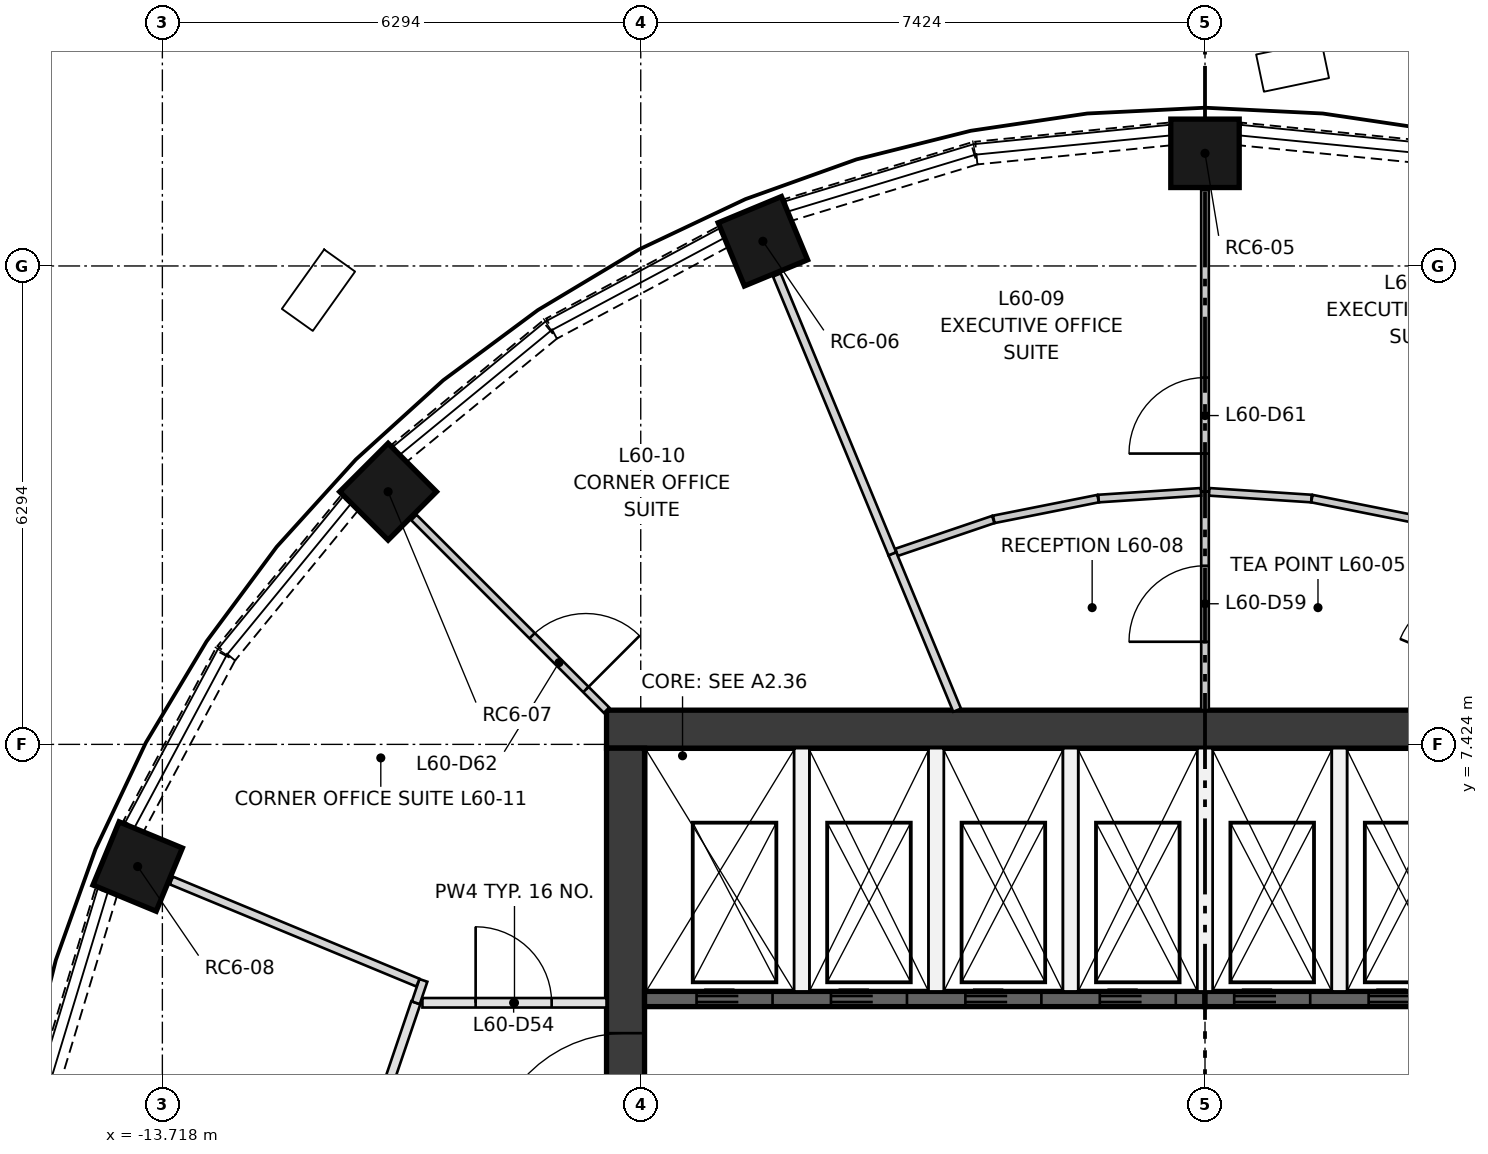
"""IFC4 building model, lengths in metres.
Left out: names, types, materials, properties, quantities, classifications, styles, units other than length and angle.
Written with IfcOpenShell. Run it as: python <this file> out.ifc"""

import sys

from ifc_helpers import new_model, si_unit, direction, frame, frame_2d, origin, origin_2d, place, context, subcontext, project, spatial, rectangle, extrude, element, fill, save


model = new_model("IFC4")
c1 = context("Model", 3, precision=1e-05, world=origin(), true_north=direction((0.0, 1.0)))
c2 = subcontext(c1, "Body", "Model", "MODEL_VIEW")
j1 = project(units=[si_unit("LENGTHUNIT", "METRE"), si_unit("PLANEANGLEUNIT", "RADIAN")], contexts=[c1])
p1 = place(None, origin())
s1 = spatial("IfcSite", under=j1, at=p1, CompositionType="ELEMENT")
p2 = place(p1, origin())
s2 = spatial("IfcBuilding", under=s1, at=p2, CompositionType="ELEMENT")
p3 = place(p2, frame((0.0, 0.0, 221.15)))
s3 = spatial("IfcBuildingStorey", under=s2, at=p3, CompositionType="ELEMENT", Elevation=221.15)
for number, where, z_axis, x_axis in (
    (1, (0.0, 15.2, 0.0), (0.0, 0.0, 1.0), (0.0, 1.0, 0.0)),
    (2, (-5.817, 14.043, 0.0), (0.0, 0.0, 1.0), (-0.383, 0.924, 0.0)),
    (3, (-10.748, 10.748, 0.0), (0.0, 0.0, 1.0), (-0.707, 0.707, 0.0)),
    (4, (-14.043, 5.817, 0.0), (0.0, 0.0, 1.0), (-0.924, 0.383, 0.0)),
):
    element("IfcColumn", number, at=place(p3, frame(where, z_axis=z_axis, x_axis=x_axis)), inside=s3, PredefinedType="COLUMN", context=c2, shape_type="SweptSolid", body=[
        extrude(rectangle(XDim=0.9, YDim=0.9, at=origin_2d()), origin(), (0.0, 0.0, 1.0), 2.85),
    ])
p4 = place(p3, frame((-7.874, 7.624, 0.0), z_axis=(0.0, 0.0, 1.0), x_axis=(1.0, 0.0, 0.0)))
e5 = element("IfcWall", 5, at=p4, inside=s3, PredefinedType="SHEAR", context=c2, shape_type="SweptSolid", body=[
    extrude(rectangle(XDim=15.748, YDim=0.5, at=frame_2d((7.874, 0.0))), origin(), (0.0, 0.0, 1.0), 3.35),
])
p5 = place(p3, frame((-7.624, -7.374, 0.0), z_axis=(0.0, 0.0, 1.0), x_axis=(0.0, 1.0, 0.0)))
e6 = element("IfcWall", 6, at=p5, inside=s3, PredefinedType="SHEAR", context=c2, shape_type="SweptSolid", body=[
    extrude(rectangle(XDim=14.748, YDim=0.5, at=frame_2d((7.374, 0.0))), origin(), (0.0, 0.0, 1.0), 3.35),
])
p6 = place(p5, frame((6.874, 0.0, 0.0)))
e7 = element("IfcOpeningElement", 7, at=p6, cuts=e6, PredefinedType="OPENING", context=c2, shape_type="SweptSolid", body=[
    extrude(rectangle(XDim=1.0, YDim=2.1, at=frame_2d((0.5, 1.05))), frame((0.0, 0.26, 0.0), z_axis=(0.0, -1.0, 0.0), x_axis=(1.0, 0.0, 0.0)), (0.0, 0.0, 1.0), 0.52),
])
p7 = place(p5, frame((3.75, 0.0, 0.0)))
e8 = element("IfcOpeningElement", 8, at=p7, cuts=e6, PredefinedType="OPENING", context=c2, shape_type="SweptSolid", body=[
    extrude(rectangle(XDim=1.8, YDim=2.1, at=frame_2d((0.9, 1.05))), frame((0.0, 0.26, 0.0), z_axis=(0.0, -1.0, 0.0), x_axis=(1.0, 0.0, 0.0)), (0.0, 0.0, 1.0), 0.52),
])
p8 = place(p5, frame((9.198, 0.0, 0.0)))
e9 = element("IfcOpeningElement", 9, at=p8, cuts=e6, PredefinedType="OPENING", context=c2, shape_type="SweptSolid", body=[
    extrude(rectangle(XDim=1.8, YDim=2.1, at=frame_2d((0.9, 1.05))), frame((0.0, 0.26, 0.0), z_axis=(0.0, -1.0, 0.0), x_axis=(1.0, 0.0, 0.0)), (0.0, 0.0, 1.0), 0.52),
])
p9 = place(p3, frame((-7.374, 4.074, 0.0), z_axis=(0.0, 0.0, 1.0), x_axis=(1.0, 0.0, 0.0)))
e10 = element("IfcWall", 10, at=p9, inside=s3, PredefinedType="SHEAR", context=c2, shape_type="SweptSolid", body=[
    extrude(rectangle(XDim=7.374, YDim=0.2, at=frame_2d((3.687, 0.0))), origin(), (0.0, 0.0, 1.0), 3.0),
])
p10 = place(p9, frame((0.684, 0.0, 0.0)))
e11 = element("IfcOpeningElement", 11, at=p10, cuts=e10, PredefinedType="OPENING", context=c2, shape_type="SweptSolid", body=[
    extrude(rectangle(XDim=1.0, YDim=2.1, at=frame_2d((0.5, 1.05))), frame((0.0, 0.11, 0.0), z_axis=(0.0, -1.0, 0.0), x_axis=(1.0, 0.0, 0.0)), (0.0, 0.0, 1.0), 0.22),
])
p11 = place(p9, frame((2.453, 0.0, 0.0)))
e12 = element("IfcOpeningElement", 12, at=p11, cuts=e10, PredefinedType="OPENING", context=c2, shape_type="SweptSolid", body=[
    extrude(rectangle(XDim=1.0, YDim=2.1, at=frame_2d((0.5, 1.05))), frame((0.0, 0.11, 0.0), z_axis=(0.0, -1.0, 0.0), x_axis=(1.0, 0.0, 0.0)), (0.0, 0.0, 1.0), 0.22),
])
p12 = place(p9, frame((4.221, 0.0, 0.0)))
e13 = element("IfcOpeningElement", 13, at=p12, cuts=e10, PredefinedType="OPENING", context=c2, shape_type="SweptSolid", body=[
    extrude(rectangle(XDim=1.0, YDim=2.1, at=frame_2d((0.5, 1.05))), frame((0.0, 0.11, 0.0), z_axis=(0.0, -1.0, 0.0), x_axis=(1.0, 0.0, 0.0)), (0.0, 0.0, 1.0), 0.22),
])
p13 = place(p9, frame((5.99, 0.0, 0.0)))
e14 = element("IfcOpeningElement", 14, at=p13, cuts=e10, PredefinedType="OPENING", context=c2, shape_type="SweptSolid", body=[
    extrude(rectangle(XDim=1.0, YDim=2.1, at=frame_2d((0.5, 1.05))), frame((0.0, 0.11, 0.0), z_axis=(0.0, -1.0, 0.0), x_axis=(1.0, 0.0, 0.0)), (0.0, 0.0, 1.0), 0.22),
])
p14 = place(p3, frame((0.0, 4.074, 0.0), z_axis=(0.0, 0.0, 1.0), x_axis=(1.0, 0.0, 0.0)))
e15 = element("IfcWall", 15, at=p14, inside=s3, PredefinedType="SHEAR", context=c2, shape_type="SweptSolid", body=[
    extrude(rectangle(XDim=7.374, YDim=0.2, at=frame_2d((3.687, 0.0))), origin(), (0.0, 0.0, 1.0), 3.0),
])
p15 = place(p14, frame((0.384, 0.0, 0.0)))
e16 = element("IfcOpeningElement", 16, at=p15, cuts=e15, PredefinedType="OPENING", context=c2, shape_type="SweptSolid", body=[
    extrude(rectangle(XDim=1.0, YDim=2.1, at=frame_2d((0.5, 1.05))), frame((0.0, 0.11, 0.0), z_axis=(0.0, -1.0, 0.0), x_axis=(1.0, 0.0, 0.0)), (0.0, 0.0, 1.0), 0.22),
])
p16 = place(p14, frame((2.153, 0.0, 0.0)))
e17 = element("IfcOpeningElement", 17, at=p16, cuts=e15, PredefinedType="OPENING", context=c2, shape_type="SweptSolid", body=[
    extrude(rectangle(XDim=1.0, YDim=2.1, at=frame_2d((0.5, 1.05))), frame((0.0, 0.11, 0.0), z_axis=(0.0, -1.0, 0.0), x_axis=(1.0, 0.0, 0.0)), (0.0, 0.0, 1.0), 0.22),
])
p17 = place(p14, frame((3.921, 0.0, 0.0)))
e18 = element("IfcOpeningElement", 18, at=p17, cuts=e15, PredefinedType="OPENING", context=c2, shape_type="SweptSolid", body=[
    extrude(rectangle(XDim=1.0, YDim=2.1, at=frame_2d((0.5, 1.05))), frame((0.0, 0.11, 0.0), z_axis=(0.0, -1.0, 0.0), x_axis=(1.0, 0.0, 0.0)), (0.0, 0.0, 1.0), 0.22),
])
p18 = place(p14, frame((5.79, 0.0, 0.0)))
e19 = element("IfcOpeningElement", 19, at=p18, cuts=e15, PredefinedType="OPENING", context=c2, shape_type="SweptSolid", body=[
    extrude(rectangle(XDim=0.8, YDim=2.1, at=frame_2d((0.4, 1.05))), frame((0.0, 0.11, 0.0), z_axis=(0.0, -1.0, 0.0), x_axis=(1.0, 0.0, 0.0)), (0.0, 0.0, 1.0), 0.22),
])
for number, where, z_axis, x_axis in (
    (20, (-5.305, 4.174, 0.0), (0.0, 0.0, 1.0), (0.0, 1.0, 0.0)),
    (21, (-3.537, 4.174, 0.0), (0.0, 0.0, 1.0), (0.0, 1.0, 0.0)),
    (22, (-1.769, 4.174, 0.0), (0.0, 0.0, 1.0), (0.0, 1.0, 0.0)),
    (23, (0.0, 4.174, 0.0), (0.0, 0.0, 1.0), (0.0, 1.0, 0.0)),
    (24, (1.769, 4.174, 0.0), (0.0, 0.0, 1.0), (0.0, 1.0, 0.0)),
):
    element("IfcWall", number, at=place(p3, frame(where, z_axis=z_axis, x_axis=x_axis)), inside=s3, PredefinedType="PARTITIONING", context=c2, shape_type="SweptSolid", body=[
        extrude(rectangle(XDim=3.2, YDim=0.2, at=frame_2d((1.6, 0.0))), origin(), (0.0, 0.0, 1.0), 3.0),
    ])
for number, where, z_axis, x_axis in (
    (25, (3.009, 15.204, 0.0), (0.0, 0.0, 1.0), (-0.995, 0.098, 0.0)),
    (26, (-0.464, 15.455, 0.0), (0.0, 0.0, 1.0), (-0.995, -0.098, 0.0)),
):
    element("IfcWall", number, at=place(p3, frame(where, z_axis=z_axis, x_axis=x_axis)), inside=s3, PredefinedType="SOLIDWALL", context=c2, shape_type="SweptSolid", body=[
        extrude(rectangle(XDim=2.558, YDim=0.3, at=frame_2d((1.279, 0.0))), origin(), (0.0, 0.0, 1.0), 0.9),
    ])
p19 = place(p3, frame((-3.038, 15.198, 0.0), z_axis=(0.0, 0.0, 1.0), x_axis=(-0.956960147557, -0.290219358397, 0.0)))
e27 = element("IfcWall", 27, at=p19, inside=s3, PredefinedType="SOLIDWALL", context=c2, shape_type="SweptSolid", body=[
    extrude(rectangle(XDim=2.557, YDim=0.3, at=frame_2d((1.279, 0.0))), origin(), (0.0, 0.0, 1.0), 0.9),
])
p20 = place(p3, frame((-6.343, 14.1, 0.0), z_axis=(0.0, 0.0, 1.0), x_axis=(-0.881810499649, -0.471603904468, 0.0)))
e28 = element("IfcWall", 28, at=p20, inside=s3, PredefinedType="SOLIDWALL", context=c2, shape_type="SweptSolid", body=[
    extrude(rectangle(XDim=2.557, YDim=0.3, at=frame_2d((1.278, 0.0))), origin(), (0.0, 0.0, 1.0), 0.9),
])
for number, where, z_axis, x_axis in (
    (29, (-8.623, 12.877, 0.0), (0.0, 0.0, 1.0), (-0.773, -0.634, 0.0)),
    (30, (-11.256, 10.6, 0.0), (0.0, 0.0, 1.0), (-0.634, -0.773, 0.0)),
):
    element("IfcWall", number, at=place(p3, frame(where, z_axis=z_axis, x_axis=x_axis)), inside=s3, PredefinedType="SOLIDWALL", context=c2, shape_type="SweptSolid", body=[
        extrude(rectangle(XDim=2.558, YDim=0.3, at=frame_2d((1.279, 0.0))), origin(), (0.0, 0.0, 1.0), 0.9),
    ])
p21 = place(p3, frame((-12.894, 8.598, 0.0), z_axis=(0.0, 0.0, 1.0), x_axis=(-0.471603904468, -0.881810499649, 0.0)))
e31 = element("IfcWall", 31, at=p21, inside=s3, PredefinedType="SOLIDWALL", context=c2, shape_type="SweptSolid", body=[
    extrude(rectangle(XDim=2.557, YDim=0.3, at=frame_2d((1.278, 0.0))), origin(), (0.0, 0.0, 1.0), 0.9),
])
p22 = place(p3, frame((-14.455, 5.486, 0.0), z_axis=(0.0, 0.0, 1.0), x_axis=(-0.290219358397, -0.956960147557, 0.0)))
e32 = element("IfcWall", 32, at=p22, inside=s3, PredefinedType="SOLIDWALL", context=c2, shape_type="SweptSolid", body=[
    extrude(rectangle(XDim=2.557, YDim=0.3, at=frame_2d((1.279, 0.0))), origin(), (0.0, 0.0, 1.0), 0.9),
])
p23 = place(p3, frame((-10.296, 4.024, 0.0), z_axis=(0.0, 0.0, 1.0), x_axis=(1.0, 0.0, 0.0)))
e33 = element("IfcWall", 33, at=p23, inside=s3, PredefinedType="PARTITIONING", context=c2, shape_type="SweptSolid", body=[
    extrude(rectangle(XDim=2.422, YDim=0.125, at=frame_2d((1.211, 0.0))), origin(), (0.0, 0.0, 1.0), 3.0),
])
p24 = place(p23, frame((0.7, 0.0, 0.0)))
e34 = element("IfcOpeningElement", 34, at=p24, cuts=e33, PredefinedType="OPENING", context=c2, shape_type="SweptSolid", body=[
    extrude(rectangle(XDim=1.0, YDim=2.1, at=frame_2d((0.5, 1.05))), frame((0.0, 0.073, 0.0), z_axis=(0.0, -1.0, 0.0), x_axis=(1.0, 0.0, 0.0)), (0.0, 0.0, 1.0), 0.145),
])
p25 = place(p3, frame((-10.769, 2.89, 0.0), z_axis=(0.0, 0.0, 1.0), x_axis=(0.321479033524, 0.946916696972, 0.0)))
e35 = element("IfcWall", 35, at=p25, inside=s3, PredefinedType="PARTITIONING", context=c2, shape_type="SweptSolid", body=[
    extrude(rectangle(XDim=1.198, YDim=0.125, at=frame_2d((0.599, 0.0))), origin(), (0.0, 0.0, 1.0), 3.0),
])
p26 = place(p3, frame((0.053, 10.747, 0.0), z_axis=(0.0, 0.0, 1.0), x_axis=(0.99785346224, -0.06548639473, 0.0)))
e36 = element("IfcWall", 36, at=p26, inside=s3, PredefinedType="PARTITIONING", context=c2, shape_type="SweptSolid", body=[
    extrude(rectangle(XDim=1.35, YDim=0.1, at=frame_2d((0.675, 0.0))), origin(), (0.0, 0.0, 1.0), 3.0),
])
p27 = place(p3, frame((1.406, 10.657, 0.0), z_axis=(0.0, 0.0, 1.0), x_axis=(0.980761417594, -0.19521025014, 0.0)))
e37 = element("IfcWall", 37, at=p27, inside=s3, PredefinedType="PARTITIONING", context=c2, shape_type="SweptSolid", body=[
    extrude(rectangle(XDim=1.399, YDim=0.1, at=frame_2d((0.7, 0.0))), origin(), (0.0, 0.0, 1.0), 3.0),
])
p28 = place(p3, frame((0.0, 7.874, 0.0), z_axis=(0.0, 0.0, 1.0), x_axis=(0.0, 1.0, 0.0)))
e38 = element("IfcWall", 38, at=p28, inside=s3, PredefinedType="PARTITIONING", context=c2, shape_type="SweptSolid", body=[
    extrude(rectangle(XDim=2.876, YDim=0.1, at=frame_2d((1.438, 0.0))), origin(), (0.0, 0.0, 1.0), 3.0),
])
p29 = place(p28, frame((0.9, 0.0, 0.0)))
e39 = element("IfcOpeningElement", 39, at=p29, cuts=e38, PredefinedType="OPENING", context=c2, shape_type="SweptSolid", body=[
    extrude(rectangle(XDim=1.0, YDim=2.1, at=frame_2d((0.5, 1.05))), frame((0.0, 0.06, 0.0), z_axis=(0.0, -1.0, 0.0), x_axis=(1.0, 0.0, 0.0)), (0.0, 0.0, 1.0), 0.12),
])
p30 = place(p3, frame((0.0, 10.75, 0.0), z_axis=(0.0, 0.0, 1.0), x_axis=(0.0, 1.0, 0.0)))
e40 = element("IfcWall", 40, at=p30, inside=s3, PredefinedType="PARTITIONING", context=c2, shape_type="SweptSolid", body=[
    extrude(rectangle(XDim=3.97, YDim=0.1, at=frame_2d((1.985, 0.0))), origin(), (0.0, 0.0, 1.0), 3.0),
])
p31 = place(p30, frame((0.5, 0.0, 0.0)))
e41 = element("IfcOpeningElement", 41, at=p31, cuts=e40, PredefinedType="OPENING", context=c2, shape_type="SweptSolid", body=[
    extrude(rectangle(XDim=1.0, YDim=2.1, at=frame_2d((0.5, 1.05))), frame((0.0, 0.06, 0.0), z_axis=(0.0, -1.0, 0.0), x_axis=(1.0, 0.0, 0.0)), (0.0, 0.0, 1.0), 0.12),
])
p32 = place(p3, frame((-4.059, 9.95, 0.0), z_axis=(0.0, 0.0, 1.0), x_axis=(0.946944164887, 0.321398115407, 0.0)))
e42 = element("IfcWall", 42, at=p32, inside=s3, PredefinedType="PARTITIONING", context=c2, shape_type="SweptSolid", body=[
    extrude(rectangle(XDim=1.344, YDim=0.1, at=frame_2d((0.672, 0.0))), origin(), (0.0, 0.0, 1.0), 3.0),
])
p33 = place(p3, frame((-2.779, 10.384, 0.0), z_axis=(0.0, 0.0, 1.0), x_axis=(0.980761417594, 0.19521025014, 0.0)))
e43 = element("IfcWall", 43, at=p33, inside=s3, PredefinedType="PARTITIONING", context=c2, shape_type="SweptSolid", body=[
    extrude(rectangle(XDim=1.399, YDim=0.1, at=frame_2d((0.7, 0.0))), origin(), (0.0, 0.0, 1.0), 3.0),
])
p34 = place(p3, frame((-1.4, 10.658, 0.0), z_axis=(0.0, 0.0, 1.0), x_axis=(0.99785346224, 0.06548639473, 0.0)))
e44 = element("IfcWall", 44, at=p34, inside=s3, PredefinedType="PARTITIONING", context=c2, shape_type="SweptSolid", body=[
    extrude(rectangle(XDim=1.35, YDim=0.1, at=frame_2d((0.675, 0.0))), origin(), (0.0, 0.0, 1.0), 3.0),
])
p35 = place(p3, frame((-3.261, 7.874, 0.0), z_axis=(0.0, 0.0, 1.0), x_axis=(-0.382684189911, 0.923879218725, 0.0)))
e45 = element("IfcWall", 45, at=p35, inside=s3, PredefinedType="PARTITIONING", context=c2, shape_type="SweptSolid", body=[
    extrude(rectangle(XDim=2.227, YDim=0.11, at=frame_2d((1.114, 0.0))), origin(), (0.0, 0.0, 1.0), 3.0),
])
p36 = place(p3, frame((-4.114, 9.932, 0.0), z_axis=(0.0, 0.0, 1.0), x_axis=(-0.382675844596, 0.923882675432, 0.0)))
e46 = element("IfcWall", 46, at=p36, inside=s3, PredefinedType="PARTITIONING", context=c2, shape_type="SweptSolid", body=[
    extrude(rectangle(XDim=3.97, YDim=0.11, at=frame_2d((1.985, 0.0))), origin(), (0.0, 0.0, 1.0), 3.0),
])
p37 = place(p3, frame((-10.409, 10.409, 0.0), z_axis=(0.0, 0.0, 1.0), x_axis=(0.707106781187, -0.707106781187, 0.0)))
e47 = element("IfcWall", 47, at=p37, inside=s3, PredefinedType="PARTITIONING", context=c2, shape_type="SweptSolid", body=[
    extrude(rectangle(XDim=3.584, YDim=0.1, at=frame_2d((1.792, 0.0))), origin(), (0.0, 0.0, 1.0), 3.0),
])
p38 = place(p37, frame((2.2, 0.0, 0.0)))
e48 = element("IfcOpeningElement", 48, at=p38, cuts=e47, PredefinedType="OPENING", context=c2, shape_type="SweptSolid", body=[
    extrude(rectangle(XDim=1.0, YDim=2.1, at=frame_2d((0.5, 1.05))), frame((0.0, 0.06, 0.0), z_axis=(0.0, -1.0, 0.0), x_axis=(1.0, 0.0, 0.0)), (0.0, 0.0, 1.0), 0.12),
])
p39 = place(p3, frame((-10.384, 4.024, 0.0), z_axis=(0.0, 0.0, 1.0), x_axis=(0.320931919594, 0.947102266382, 0.0)))
e49 = element("IfcWall", 49, at=p39, inside=s3, PredefinedType="PARTITIONING", context=c2, shape_type="SweptSolid", body=[
    extrude(rectangle(XDim=0.311, YDim=0.11, at=frame_2d((0.156, 0.0))), origin(), (0.0, 0.0, 1.0), 3.0),
])
p40 = place(p3, frame((-10.356, 4.289, 0.0), z_axis=(0.0, 0.0, 1.0), x_axis=(-0.923871065891, 0.382703871955, 0.0)))
e50 = element("IfcWall", 50, at=p40, inside=s3, PredefinedType="PARTITIONING", context=c2, shape_type="SweptSolid", body=[
    extrude(rectangle(XDim=3.511, YDim=0.11, at=frame_2d((1.756, 0.0))), origin(), (0.0, 0.0, 1.0), 3.0),
])
p41 = place(p10, frame((1.0, 0.0, 0.0), z_axis=(0.0, 0.0, 1.0), x_axis=(-1.0, 0.0, 0.0)))
e51 = element("IfcDoor", 51, at=p41, inside=s3, OperationType="DOUBLE_DOOR_SLIDING", PredefinedType="DOOR", context=c2, shape_type="SweptSolid", body=[
    extrude(rectangle(XDim=1.0, YDim=2.1, at=frame_2d((0.5, 1.05))), frame((0.0, 0.025, 0.0), z_axis=(0.0, -1.0, 0.0), x_axis=(1.0, 0.0, 0.0)), (0.0, 0.0, 1.0), 0.05),
])
fill(e11, e51)
p42 = place(p11, frame((1.0, 0.0, 0.0), z_axis=(0.0, 0.0, 1.0), x_axis=(-1.0, 0.0, 0.0)))
e52 = element("IfcDoor", 52, at=p42, inside=s3, OperationType="DOUBLE_DOOR_SLIDING", PredefinedType="DOOR", context=c2, shape_type="SweptSolid", body=[
    extrude(rectangle(XDim=1.0, YDim=2.1, at=frame_2d((0.5, 1.05))), frame((0.0, 0.025, 0.0), z_axis=(0.0, -1.0, 0.0), x_axis=(1.0, 0.0, 0.0)), (0.0, 0.0, 1.0), 0.05),
])
fill(e12, e52)
p43 = place(p12, frame((1.0, 0.0, 0.0), z_axis=(0.0, 0.0, 1.0), x_axis=(-1.0, 0.0, 0.0)))
e53 = element("IfcDoor", 53, at=p43, inside=s3, OperationType="DOUBLE_DOOR_SLIDING", PredefinedType="DOOR", context=c2, shape_type="SweptSolid", body=[
    extrude(rectangle(XDim=1.0, YDim=2.1, at=frame_2d((0.5, 1.05))), frame((0.0, 0.025, 0.0), z_axis=(0.0, -1.0, 0.0), x_axis=(1.0, 0.0, 0.0)), (0.0, 0.0, 1.0), 0.05),
])
fill(e13, e53)
p44 = place(p13, frame((1.0, 0.0, 0.0), z_axis=(0.0, 0.0, 1.0), x_axis=(-1.0, 0.0, 0.0)))
e54 = element("IfcDoor", 54, at=p44, inside=s3, OperationType="DOUBLE_DOOR_SLIDING", PredefinedType="DOOR", context=c2, shape_type="SweptSolid", body=[
    extrude(rectangle(XDim=1.0, YDim=2.1, at=frame_2d((0.5, 1.05))), frame((0.0, 0.025, 0.0), z_axis=(0.0, -1.0, 0.0), x_axis=(1.0, 0.0, 0.0)), (0.0, 0.0, 1.0), 0.05),
])
fill(e14, e54)
p45 = place(p15, frame((1.0, 0.0, 0.0), z_axis=(0.0, 0.0, 1.0), x_axis=(-1.0, 0.0, 0.0)))
e55 = element("IfcDoor", 55, at=p45, inside=s3, OperationType="DOUBLE_DOOR_SLIDING", PredefinedType="DOOR", context=c2, shape_type="SweptSolid", body=[
    extrude(rectangle(XDim=1.0, YDim=2.1, at=frame_2d((0.5, 1.05))), frame((0.0, 0.025, 0.0), z_axis=(0.0, -1.0, 0.0), x_axis=(1.0, 0.0, 0.0)), (0.0, 0.0, 1.0), 0.05),
])
fill(e16, e55)
p46 = place(p16, frame((1.0, 0.0, 0.0), z_axis=(0.0, 0.0, 1.0), x_axis=(-1.0, 0.0, 0.0)))
e56 = element("IfcDoor", 56, at=p46, inside=s3, OperationType="DOUBLE_DOOR_SLIDING", PredefinedType="DOOR", context=c2, shape_type="SweptSolid", body=[
    extrude(rectangle(XDim=1.0, YDim=2.1, at=frame_2d((0.5, 1.05))), frame((0.0, 0.025, 0.0), z_axis=(0.0, -1.0, 0.0), x_axis=(1.0, 0.0, 0.0)), (0.0, 0.0, 1.0), 0.05),
])
fill(e17, e56)
p47 = place(p8, origin())
e57 = element("IfcDoor", 57, at=p47, inside=s3, OperationType="DOUBLE_DOOR_SINGLE_SWING", PredefinedType="DOOR", context=c2, shape_type="SweptSolid", body=[
    extrude(rectangle(XDim=1.8, YDim=2.1, at=frame_2d((0.9, 1.05))), frame((0.0, 0.025, 0.0), z_axis=(0.0, -1.0, 0.0), x_axis=(1.0, 0.0, 0.0)), (0.0, 0.0, 1.0), 0.05),
])
fill(e9, e57)
p48 = place(p24, origin())
e58 = element("IfcDoor", 58, at=p48, inside=s3, OperationType="SINGLE_SWING_LEFT", PredefinedType="DOOR", context=c2, shape_type="SweptSolid", body=[
    extrude(rectangle(XDim=1.0, YDim=2.1, at=frame_2d((0.5, 1.05))), frame((0.0, 0.025, 0.0), z_axis=(0.0, -1.0, 0.0), x_axis=(1.0, 0.0, 0.0)), (0.0, 0.0, 1.0), 0.05),
])
fill(e34, e58)
p49 = place(p29, origin())
e59 = element("IfcDoor", 59, at=p49, inside=s3, OperationType="SINGLE_SWING_LEFT", PredefinedType="DOOR", context=c2, shape_type="SweptSolid", body=[
    extrude(rectangle(XDim=1.0, YDim=2.1, at=frame_2d((0.5, 1.05))), frame((0.0, 0.025, 0.0), z_axis=(0.0, -1.0, 0.0), x_axis=(1.0, 0.0, 0.0)), (0.0, 0.0, 1.0), 0.05),
])
fill(e39, e59)
p50 = place(p31, origin())
e60 = element("IfcDoor", 60, at=p50, inside=s3, OperationType="SINGLE_SWING_LEFT", PredefinedType="DOOR", context=c2, shape_type="SweptSolid", body=[
    extrude(rectangle(XDim=1.0, YDim=2.1, at=frame_2d((0.5, 1.05))), frame((0.0, 0.025, 0.0), z_axis=(0.0, -1.0, 0.0), x_axis=(1.0, 0.0, 0.0)), (0.0, 0.0, 1.0), 0.05),
])
fill(e41, e60)
p51 = place(p38, origin())
e61 = element("IfcDoor", 61, at=p51, inside=s3, OperationType="SINGLE_SWING_RIGHT", PredefinedType="DOOR", context=c2, shape_type="SweptSolid", body=[
    extrude(rectangle(XDim=1.0, YDim=2.1, at=frame_2d((0.5, 1.05))), frame((0.0, 0.025, 0.0), z_axis=(0.0, -1.0, 0.0), x_axis=(1.0, 0.0, 0.0)), (0.0, 0.0, 1.0), 0.05),
])
fill(e48, e61)
save(model, sys.argv[1])
